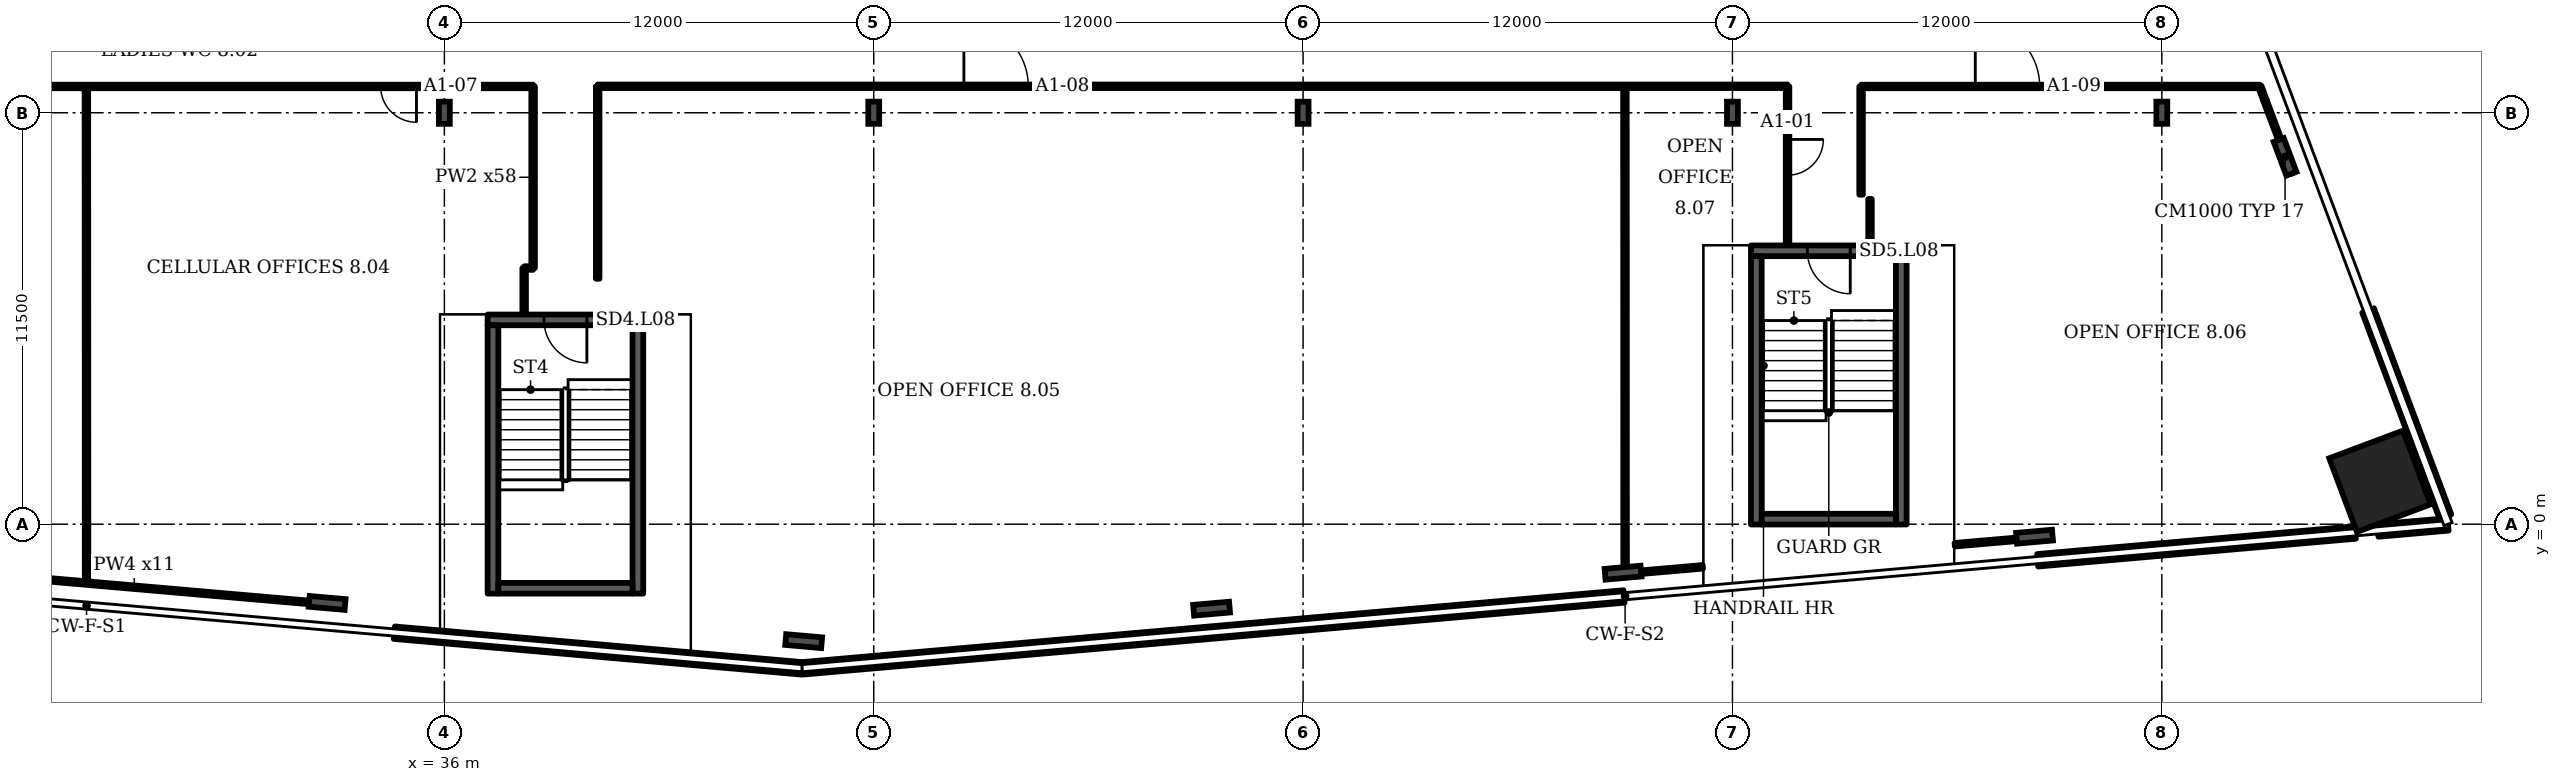
"""IFC4 building model, lengths in metres.
Left out: names, types, materials, properties, quantities, classifications, styles, units other than length and angle.
Written with IfcOpenShell. Run it as: python <this file> out.ifc"""

import sys

from ifc_helpers import new_model, si_unit, direction, frame, frame_2d, origin, origin_2d, place, context, subcontext, project, spatial, rectangle, i_section, extrude, element, fill, save


model = new_model("IFC4")
c1 = context("Model", 3, precision=1e-05, world=origin(), true_north=direction((0.0, 1.0)))
c2 = subcontext(c1, "Body", "Model", "MODEL_VIEW")
j1 = project(units=[si_unit("LENGTHUNIT", "METRE"), si_unit("PLANEANGLEUNIT", "RADIAN")], contexts=[c1])
p1 = place(None, origin())
s1 = spatial("IfcSite", under=j1, at=p1, CompositionType="ELEMENT")
p2 = place(p1, origin())
s2 = spatial("IfcBuilding", under=s1, at=p2, CompositionType="ELEMENT")
p3 = place(p2, frame((0.0, 0.0, 48.7)))
s3 = spatial("IfcBuildingStorey", under=s2, at=p3, CompositionType="ELEMENT", Elevation=48.7)
p4 = place(p3, frame((90.096, 1.2, 0.0), z_axis=(0.0, 0.0, 1.0), x_axis=(-0.351123, 0.936328, 0.0)))
e1 = element("IfcColumn", 1, at=p4, inside=s3, PredefinedType="COLUMN", context=c2, shape_type="SweptSolid", body=[
    extrude(rectangle(XDim=2.2, YDim=2.2, at=origin_2d()), origin(), (0.0, 0.0, 1.0), 3.6),
])
for number, where, z_axis, x_axis in (
    (2, (32.724, -2.2, 0.0), (0.0, 0.0, 1.0), (-0.087, -0.996, 0.0)),
    (3, (46.042, -3.268, 0.0), (0.0, 0.0, 1.0), (-0.087, -0.996, 0.0)),
    (4, (57.442, -2.361, 0.0), (0.0, 0.0, 1.0), (0.087, -0.996, 0.0)),
    (5, (68.942, -1.355, 0.0), (0.0, 0.0, 1.0), (0.087, -0.996, 0.0)),
    (6, (80.442, -0.349, 0.0), (0.0, 0.0, 1.0), (0.087, -0.996, 0.0)),
    (7, (87.445, 10.268, 0.0), (0.0, 0.0, 1.0), (0.936, 0.351, 0.0)),
):
    element("IfcColumn", number, at=place(p3, frame(where, z_axis=z_axis, x_axis=x_axis)), inside=s3, PredefinedType="COLUMN", context=c2, shape_type="SweptSolid", body=[
        extrude(i_section(OverallWidth=0.302, OverallDepth=1.008, WebThickness=0.021, FlangeThickness=0.04, FilletRadius=0.03, at=origin_2d()), origin(), (0.0, 0.0, 1.0), 3.6),
    ])
for number, where, z_axis, x_axis in (
    (8, (36.0, 11.5, 0.0), (0.0, 0.0, 1.0), (1.0, 0.0, 0.0)),
    (9, (48.0, 11.5, 0.0), (0.0, 0.0, 1.0), (1.0, 0.0, 0.0)),
    (10, (60.0, 11.5, 0.0), (0.0, 0.0, 1.0), (1.0, 0.0, 0.0)),
    (11, (72.0, 11.5, 0.0), (0.0, 0.0, 1.0), (1.0, 0.0, 0.0)),
    (12, (84.0, 11.5, 0.0), (0.0, 0.0, 1.0), (1.0, 0.0, 0.0)),
):
    element("IfcColumn", number, at=place(p3, frame(where, z_axis=z_axis, x_axis=x_axis)), inside=s3, PredefinedType="COLUMN", context=c2, shape_type="SweptSolid", body=[
        extrude(i_section(OverallWidth=0.305, OverallDepth=0.62, WebThickness=0.021, FlangeThickness=0.04, FilletRadius=0.027, at=origin_2d()), origin(), (0.0, 0.0, 1.0), 3.6),
    ])
p5 = place(p3, frame((34.601, -3.032, 0.0), z_axis=(0.0, 0.0, 1.0), x_axis=(0.996193, -0.087148, 0.0)))
e13 = element("IfcWall", 13, at=p5, inside=s3, PredefinedType="SOLIDWALL", context=c2, shape_type="SweptSolid", body=[
    extrude(rectangle(XDim=11.458, YDim=0.35, at=frame_2d((5.729, 0.0))), origin(), (0.0, 0.0, 1.0), 1.0),
])
p6 = place(p3, frame((46.045, -4.026, 0.0), z_axis=(0.0, 0.0, 1.0), x_axis=(0.99619, 0.087163, 0.0)))
e14 = element("IfcWall", 14, at=p6, inside=s3, PredefinedType="SOLIDWALL", context=c2, shape_type="SweptSolid", body=[
    extrude(rectangle(XDim=23.013, YDim=0.35, at=frame_2d((11.506, 0.0))), origin(), (0.0, 0.0, 1.0), 1.0),
])
p7 = place(p3, frame((80.53, -1.009, 0.0), z_axis=(0.0, 0.0, 1.0), x_axis=(0.996198, 0.087169, 0.0)))
e15 = element("IfcWall", 15, at=p7, inside=s3, PredefinedType="SOLIDWALL", context=c2, shape_type="SweptSolid", body=[
    extrude(rectangle(XDim=8.912, YDim=0.35, at=frame_2d((4.456, 0.0))), origin(), (0.0, 0.0, 1.0), 1.0),
])
p8 = place(p3, frame((90.039, -0.177, 0.0), z_axis=(0.0, 0.0, 1.0), x_axis=(0.996193, 0.08717, 0.0)))
e16 = element("IfcWall", 16, at=p8, inside=s3, PredefinedType="SOLIDWALL", context=c2, shape_type="SweptSolid", body=[
    extrude(rectangle(XDim=1.969, YDim=0.35, at=frame_2d((0.984, 0.0))), origin(), (0.0, 0.0, 1.0), 1.0),
])
p9 = place(p3, frame((91.926, 0.211, 0.0), z_axis=(0.0, 0.0, 1.0), x_axis=(-0.351118, 0.936328, 0.0)))
e17 = element("IfcWall", 17, at=p9, inside=s3, PredefinedType="SOLIDWALL", context=c2, shape_type="SweptSolid", body=[
    extrude(rectangle(XDim=6.154, YDim=0.35, at=frame_2d((3.077, 0.0))), origin(), (0.0, 0.0, 1.0), 1.0),
])
p10 = place(p3, frame((37.208, 5.711, 0.0), z_axis=(0.0, 0.0, 1.0), x_axis=(1.0, 0.0, 0.0)))
e18 = element("IfcWall", 18, at=p10, inside=s3, PredefinedType="SHEAR", context=c2, shape_type="SweptSolid", body=[
    extrude(rectangle(XDim=4.35, YDim=0.3, at=frame_2d((2.175, 0.0))), origin(), (0.0, 0.0, 1.0), 3.2),
])
p11 = place(p10, frame((1.575, 0.0, 0.0)))
e19 = element("IfcOpeningElement", 19, at=p11, cuts=e18, PredefinedType="OPENING", context=c2, shape_type="SweptSolid", body=[
    extrude(rectangle(XDim=1.2, YDim=2.1, at=frame_2d((0.6, 1.05))), frame((0.0, 0.16, 0.0), z_axis=(0.0, -1.0, 0.0), x_axis=(1.0, 0.0, 0.0)), (0.0, 0.0, 1.0), 0.32),
])
p12 = place(p3, frame((72.518, 7.642, 0.0), z_axis=(0.0, 0.0, 1.0), x_axis=(1.0, 0.0, 0.0)))
e20 = element("IfcWall", 20, at=p12, inside=s3, PredefinedType="SHEAR", context=c2, shape_type="SweptSolid", body=[
    extrude(rectangle(XDim=4.35, YDim=0.3, at=frame_2d((2.175, 0.0))), origin(), (0.0, 0.0, 1.0), 3.2),
])
p13 = place(p12, frame((1.575, 0.0, 0.0)))
e21 = element("IfcOpeningElement", 21, at=p13, cuts=e20, PredefinedType="OPENING", context=c2, shape_type="SweptSolid", body=[
    extrude(rectangle(XDim=1.2, YDim=2.1, at=frame_2d((0.6, 1.05))), frame((0.0, 0.16, 0.0), z_axis=(0.0, -1.0, 0.0), x_axis=(1.0, 0.0, 0.0)), (0.0, 0.0, 1.0), 0.32),
])
p14 = place(p3, frame((0.02, 12.235, 0.0), z_axis=(0.0, 0.0, 1.0), x_axis=(1.0, 0.0, 0.0)))
e22 = element("IfcWall", 22, at=p14, inside=s3, PredefinedType="PARTITIONING", context=c2, shape_type="SweptSolid", body=[
    extrude(rectangle(XDim=38.46, YDim=0.1, at=frame_2d((19.23, 0.0))), origin(), (0.0, 0.0, 1.0), 3.2),
])
p15 = place(p14, frame((2.405, 0.0, 0.0)))
e23 = element("IfcOpeningElement", 23, at=p15, cuts=e22, PredefinedType="OPENING", context=c2, shape_type="SweptSolid", body=[
    extrude(rectangle(XDim=1.0, YDim=2.1, at=frame_2d((0.5, 1.05))), frame((0.0, 0.06, 0.0), z_axis=(0.0, -1.0, 0.0), x_axis=(1.0, 0.0, 0.0)), (0.0, 0.0, 1.0), 0.12),
])
p16 = place(p14, frame((7.405, 0.0, 0.0)))
e24 = element("IfcOpeningElement", 24, at=p16, cuts=e22, PredefinedType="OPENING", context=c2, shape_type="SweptSolid", body=[
    extrude(rectangle(XDim=1.0, YDim=2.1, at=frame_2d((0.5, 1.05))), frame((0.0, 0.06, 0.0), z_axis=(0.0, -1.0, 0.0), x_axis=(1.0, 0.0, 0.0)), (0.0, 0.0, 1.0), 0.12),
])
p17 = place(p14, frame((13.405, 0.0, 0.0)))
e25 = element("IfcOpeningElement", 25, at=p17, cuts=e22, PredefinedType="OPENING", context=c2, shape_type="SweptSolid", body=[
    extrude(rectangle(XDim=1.0, YDim=2.1, at=frame_2d((0.5, 1.05))), frame((0.0, 0.06, 0.0), z_axis=(0.0, -1.0, 0.0), x_axis=(1.0, 0.0, 0.0)), (0.0, 0.0, 1.0), 0.12),
])
p18 = place(p14, frame((19.48, 0.0, 0.0)))
e26 = element("IfcOpeningElement", 26, at=p18, cuts=e22, PredefinedType="OPENING", context=c2, shape_type="SweptSolid", body=[
    extrude(rectangle(XDim=1.0, YDim=2.1, at=frame_2d((0.5, 1.05))), frame((0.0, 0.06, 0.0), z_axis=(0.0, -1.0, 0.0), x_axis=(1.0, 0.0, 0.0)), (0.0, 0.0, 1.0), 0.12),
])
p19 = place(p14, frame((22.205, 0.0, 0.0)))
e27 = element("IfcOpeningElement", 27, at=p19, cuts=e22, PredefinedType="OPENING", context=c2, shape_type="SweptSolid", body=[
    extrude(rectangle(XDim=1.0, YDim=2.1, at=frame_2d((0.5, 1.05))), frame((0.0, 0.06, 0.0), z_axis=(0.0, -1.0, 0.0), x_axis=(1.0, 0.0, 0.0)), (0.0, 0.0, 1.0), 0.12),
])
p20 = place(p14, frame((34.2, 0.0, 0.0)))
e28 = element("IfcOpeningElement", 28, at=p20, cuts=e22, PredefinedType="OPENING", context=c2, shape_type="SweptSolid", body=[
    extrude(rectangle(XDim=1.0, YDim=2.1, at=frame_2d((0.5, 1.05))), frame((0.0, 0.06, 0.0), z_axis=(0.0, -1.0, 0.0), x_axis=(1.0, 0.0, 0.0)), (0.0, 0.0, 1.0), 0.12),
])
p21 = place(p3, frame((26.0, -1.645, 0.0), z_axis=(0.0, 0.0, 1.0), x_axis=(-0.000352, 1.000004, 0.0)))
e29 = element("IfcWall", 29, at=p21, inside=s3, PredefinedType="PARTITIONING", context=c2, shape_type="SweptSolid", body=[
    extrude(rectangle(XDim=13.88, YDim=0.1, at=frame_2d((6.94, 0.0))), origin(), (0.0, 0.0, 1.0), 3.2),
])
p22 = place(p3, frame((32.665, -2.225, 0.0), z_axis=(0.0, 0.0, 1.0), x_axis=(-0.99623, 0.086702, 0.0)))
e30 = element("IfcWall", 30, at=p22, inside=s3, PredefinedType="PARTITIONING", context=c2, shape_type="SweptSolid", body=[
    extrude(rectangle(XDim=10.706, YDim=0.1, at=frame_2d((5.353, 0.0))), origin(), (0.0, 0.0, 1.0), 2.58),
])
p23 = place(p3, frame((38.23, 5.881, 0.0), z_axis=(0.0, 0.0, 1.0), x_axis=(0.0, 1.0, 0.0)))
e31 = element("IfcWall", 31, at=p23, inside=s3, PredefinedType="PARTITIONING", context=c2, shape_type="SweptSolid", body=[
    extrude(rectangle(XDim=1.279, YDim=0.1, at=frame_2d((0.64, 0.0))), origin(), (0.0, 0.0, 1.0), 3.2),
])
p24 = place(p3, frame((38.235, 7.16, 0.0), z_axis=(0.0, 0.0, 1.0), x_axis=(1.0, 0.0, 0.0)))
e32 = element("IfcWall", 32, at=p24, inside=s3, PredefinedType="PARTITIONING", context=c2, shape_type="SweptSolid", body=[
    extrude(rectangle(XDim=0.245, YDim=0.1, at=frame_2d((0.123, 0.0))), origin(), (0.0, 0.0, 1.0), 3.2),
])
p25 = place(p3, frame((38.48, 7.16, 0.0), z_axis=(0.0, 0.0, 1.0), x_axis=(0.0, 1.0, 0.0)))
e33 = element("IfcWall", 33, at=p25, inside=s3, PredefinedType="PARTITIONING", context=c2, shape_type="SweptSolid", body=[
    extrude(rectangle(XDim=5.075, YDim=0.1, at=frame_2d((2.538, 0.0))), origin(), (0.0, 0.0, 1.0), 3.2),
])
p26 = place(p3, frame((40.285, 6.861, 0.0), z_axis=(0.0, 0.0, 1.0), x_axis=(0.0, 1.0, 0.0)))
e34 = element("IfcWall", 34, at=p26, inside=s3, PredefinedType="PARTITIONING", context=c2, shape_type="SweptSolid", body=[
    extrude(rectangle(XDim=5.375, YDim=0.1, at=frame_2d((2.687, 0.0))), origin(), (0.0, 0.0, 1.0), 3.2),
])
p27 = place(p3, frame((40.285, 12.24, 0.0), z_axis=(0.0, 0.0, 1.0), x_axis=(1.0, 0.0, 0.0)))
e35 = element("IfcWall", 35, at=p27, inside=s3, PredefinedType="PARTITIONING", context=c2, shape_type="SweptSolid", body=[
    extrude(rectangle(XDim=33.255, YDim=0.1, at=frame_2d((16.627, 0.0))), origin(), (0.0, 0.0, 1.0), 3.2),
])
p28 = place(p27, frame((10.235, 0.0, 0.0)))
e36 = element("IfcOpeningElement", 36, at=p28, cuts=e35, PredefinedType="OPENING", context=c2, shape_type="SweptSolid", body=[
    extrude(rectangle(XDim=1.8, YDim=2.1, at=frame_2d((0.9, 1.05))), frame((0.0, 0.06, 0.0), z_axis=(0.0, -1.0, 0.0), x_axis=(1.0, 0.0, 0.0)), (0.0, 0.0, 1.0), 0.12),
])
p29 = place(p3, frame((69.0, -1.38, 0.0), z_axis=(0.0, 0.0, 1.0), x_axis=(-0.000359, 1.000002, 0.0)))
e37 = element("IfcWall", 37, at=p29, inside=s3, PredefinedType="PARTITIONING", context=c2, shape_type="SweptSolid", body=[
    extrude(rectangle(XDim=13.615, YDim=0.1, at=frame_2d((6.808, 0.0))), origin(), (0.0, 0.0, 1.0), 3.2),
])
p30 = place(p3, frame((69.0, -1.38, 0.0), z_axis=(0.0, 0.0, 1.0), x_axis=(0.996261, 0.086427, 0.0)))
e38 = element("IfcWall", 38, at=p30, inside=s3, PredefinedType="PARTITIONING", context=c2, shape_type="SweptSolid", body=[
    extrude(rectangle(XDim=2.181, YDim=0.1, at=frame_2d((1.09, 0.0))), origin(), (0.0, 0.0, 1.0), 2.58),
])
p31 = place(p3, frame((73.54, 7.812, 0.0), z_axis=(0.0, 0.0, 1.0), x_axis=(0.0, 1.0, 0.0)))
e39 = element("IfcWall", 39, at=p31, inside=s3, PredefinedType="PARTITIONING", context=c2, shape_type="SweptSolid", body=[
    extrude(rectangle(XDim=4.423, YDim=0.1, at=frame_2d((2.211, 0.0))), origin(), (0.0, 0.0, 1.0), 3.2),
])
p32 = place(p31, frame((1.943, 0.0, 0.0)))
e40 = element("IfcOpeningElement", 40, at=p32, cuts=e39, PredefinedType="OPENING", context=c2, shape_type="SweptSolid", body=[
    extrude(rectangle(XDim=1.0, YDim=2.1, at=frame_2d((0.5, 1.05))), frame((0.0, 0.06, 0.0), z_axis=(0.0, -1.0, 0.0), x_axis=(1.0, 0.0, 0.0)), (0.0, 0.0, 1.0), 0.12),
])
p33 = place(p3, frame((75.595, 9.21, 0.0), z_axis=(0.0, 0.0, 1.0), x_axis=(0.0, 1.0, 0.0)))
e41 = element("IfcWall", 41, at=p33, inside=s3, PredefinedType="PARTITIONING", context=c2, shape_type="SweptSolid", body=[
    extrude(rectangle(XDim=3.02, YDim=0.1, at=frame_2d((1.51, 0.0))), origin(), (0.0, 0.0, 1.0), 3.2),
])
p34 = place(p3, frame((75.595, 12.235, 0.0), z_axis=(0.0, 0.0, 1.0), x_axis=(1.0, 0.0, 0.0)))
e42 = element("IfcWall", 42, at=p34, inside=s3, PredefinedType="PARTITIONING", context=c2, shape_type="SweptSolid", body=[
    extrude(rectangle(XDim=11.145, YDim=0.1, at=frame_2d((5.573, 0.0))), origin(), (0.0, 0.0, 1.0), 3.2),
])
p35 = place(p34, frame((3.192, 0.0, 0.0)))
e43 = element("IfcOpeningElement", 43, at=p35, cuts=e42, PredefinedType="OPENING", context=c2, shape_type="SweptSolid", body=[
    extrude(rectangle(XDim=1.8, YDim=2.1, at=frame_2d((0.9, 1.05))), frame((0.0, 0.06, 0.0), z_axis=(0.0, -1.0, 0.0), x_axis=(1.0, 0.0, 0.0)), (0.0, 0.0, 1.0), 0.12),
])
p36 = place(p3, frame((75.845, 7.812, 0.0), z_axis=(0.0, 0.0, 1.0), x_axis=(0.0, 1.0, 0.0)))
e44 = element("IfcWall", 44, at=p36, inside=s3, PredefinedType="PARTITIONING", context=c2, shape_type="SweptSolid", body=[
    extrude(rectangle(XDim=1.278, YDim=0.1, at=frame_2d((0.639, 0.0))), origin(), (0.0, 0.0, 1.0), 3.2),
])
p37 = place(p3, frame((78.212, -0.573, 0.0), z_axis=(0.0, 0.0, 1.0), x_axis=(0.996271, 0.08623, 0.0)))
e45 = element("IfcWall", 45, at=p37, inside=s3, PredefinedType="PARTITIONING", context=c2, shape_type="SweptSolid", body=[
    extrude(rectangle(XDim=2.296, YDim=0.1, at=frame_2d((1.148, 0.0))), origin(), (0.0, 0.0, 1.0), 2.58),
])
p38 = place(p3, frame((86.88, 11.855, 0.0), z_axis=(0.0, 0.0, 1.0), x_axis=(-0.34537, 0.938466, 0.0)))
e46 = element("IfcWall", 46, at=p38, inside=s3, PredefinedType="PARTITIONING", context=c2, shape_type="SweptSolid", body=[
    extrude(rectangle(XDim=0.405, YDim=0.1, at=frame_2d((0.203, 0.0))), origin(), (0.0, 0.0, 1.0), 2.58),
])
p39 = place(p3, frame((87.65, 9.81, 0.0), z_axis=(0.0, 0.0, 1.0), x_axis=(-0.352397, 0.935852, 0.0)))
e47 = element("IfcWall", 47, at=p39, inside=s3, PredefinedType="PARTITIONING", context=c2, shape_type="SweptSolid", body=[
    extrude(rectangle(XDim=2.185, YDim=0.1, at=frame_2d((1.093, 0.0))), origin(), (0.0, 0.0, 1.0), 2.58),
])
for number, where, z_axis, x_axis in (
    (48, (37.358, -1.939, 0.0), (0.0, 0.0, 1.0), (0.0, 1.0, 0.0)),
    (49, (41.408, -1.939, 0.0), (0.0, 0.0, 1.0), (0.0, 1.0, 0.0)),
):
    element("IfcWall", number, at=place(p3, frame(where, z_axis=z_axis, x_axis=x_axis)), inside=s3, PredefinedType="SHEAR", context=c2, shape_type="SweptSolid", body=[
        extrude(rectangle(XDim=7.5, YDim=0.3, at=frame_2d((3.75, 0.0))), origin(), (0.0, 0.0, 1.0), 3.2),
    ])
p40 = place(p3, frame((37.508, -1.789, 0.0), z_axis=(0.0, 0.0, 1.0), x_axis=(1.0, 0.0, 0.0)))
e50 = element("IfcWall", 50, at=p40, inside=s3, PredefinedType="SHEAR", context=c2, shape_type="SweptSolid", body=[
    extrude(rectangle(XDim=3.75, YDim=0.3, at=frame_2d((1.875, 0.0))), origin(), (0.0, 0.0, 1.0), 3.2),
])
for number, where, z_axis, x_axis in (
    (51, (72.667, -0.008, 0.0), (0.0, 0.0, 1.0), (0.0, 1.0, 0.0)),
    (52, (76.718, -0.008, 0.0), (0.0, 0.0, 1.0), (0.0, 1.0, 0.0)),
):
    element("IfcWall", number, at=place(p3, frame(where, z_axis=z_axis, x_axis=x_axis)), inside=s3, PredefinedType="SHEAR", context=c2, shape_type="SweptSolid", body=[
        extrude(rectangle(XDim=7.5, YDim=0.3, at=frame_2d((3.75, 0.0))), origin(), (0.0, 0.0, 1.0), 3.2),
    ])
p41 = place(p3, frame((72.817, 0.142, 0.0), z_axis=(0.0, 0.0, 1.0), x_axis=(1.0, 0.0, 0.0)))
e53 = element("IfcWall", 53, at=p41, inside=s3, PredefinedType="SHEAR", context=c2, shape_type="SweptSolid", body=[
    extrude(rectangle(XDim=3.75, YDim=0.3, at=frame_2d((1.875, 0.0))), origin(), (0.0, 0.0, 1.0), 3.2),
])
p42 = place(p11, origin())
e54 = element("IfcDoor", 54, at=p42, inside=s3, OperationType="SINGLE_SWING_RIGHT", PredefinedType="DOOR", context=c2, shape_type="SweptSolid", body=[
    extrude(rectangle(XDim=1.2, YDim=2.1, at=frame_2d((0.6, 1.05))), frame((0.0, 0.025, 0.0), z_axis=(0.0, -1.0, 0.0), x_axis=(1.0, 0.0, 0.0)), (0.0, 0.0, 1.0), 0.05),
])
fill(e19, e54)
p43 = place(p13, origin())
e55 = element("IfcDoor", 55, at=p43, inside=s3, OperationType="SINGLE_SWING_RIGHT", PredefinedType="DOOR", context=c2, shape_type="SweptSolid", body=[
    extrude(rectangle(XDim=1.2, YDim=2.1, at=frame_2d((0.6, 1.05))), frame((0.0, 0.025, 0.0), z_axis=(0.0, -1.0, 0.0), x_axis=(1.0, 0.0, 0.0)), (0.0, 0.0, 1.0), 0.05),
])
fill(e21, e55)
p44 = place(p32, origin())
e56 = element("IfcDoor", 56, at=p44, inside=s3, OperationType="SINGLE_SWING_RIGHT", PredefinedType="DOOR", context=c2, shape_type="SweptSolid", body=[
    extrude(rectangle(XDim=1.0, YDim=2.1, at=frame_2d((0.5, 1.05))), frame((0.0, 0.025, 0.0), z_axis=(0.0, -1.0, 0.0), x_axis=(1.0, 0.0, 0.0)), (0.0, 0.0, 1.0), 0.05),
])
fill(e40, e56)
p45 = place(p20, origin())
e57 = element("IfcDoor", 57, at=p45, inside=s3, OperationType="SINGLE_SWING_RIGHT", PredefinedType="DOOR", context=c2, shape_type="SweptSolid", body=[
    extrude(rectangle(XDim=1.0, YDim=2.1, at=frame_2d((0.5, 1.05))), frame((0.0, 0.025, 0.0), z_axis=(0.0, -1.0, 0.0), x_axis=(1.0, 0.0, 0.0)), (0.0, 0.0, 1.0), 0.05),
])
fill(e28, e57)
p46 = place(p28, origin())
e58 = element("IfcDoor", 58, at=p46, inside=s3, OperationType="DOUBLE_DOOR_SINGLE_SWING", PredefinedType="DOOR", context=c2, shape_type="SweptSolid", body=[
    extrude(rectangle(XDim=1.8, YDim=2.1, at=frame_2d((0.9, 1.05))), frame((0.0, 0.025, 0.0), z_axis=(0.0, -1.0, 0.0), x_axis=(1.0, 0.0, 0.0)), (0.0, 0.0, 1.0), 0.05),
])
fill(e36, e58)
p47 = place(p35, origin())
e59 = element("IfcDoor", 59, at=p47, inside=s3, OperationType="DOUBLE_DOOR_SINGLE_SWING", PredefinedType="DOOR", context=c2, shape_type="SweptSolid", body=[
    extrude(rectangle(XDim=1.8, YDim=2.1, at=frame_2d((0.9, 1.05))), frame((0.0, 0.025, 0.0), z_axis=(0.0, -1.0, 0.0), x_axis=(1.0, 0.0, 0.0)), (0.0, 0.0, 1.0), 0.05),
])
fill(e43, e59)
save(model, sys.argv[1])
